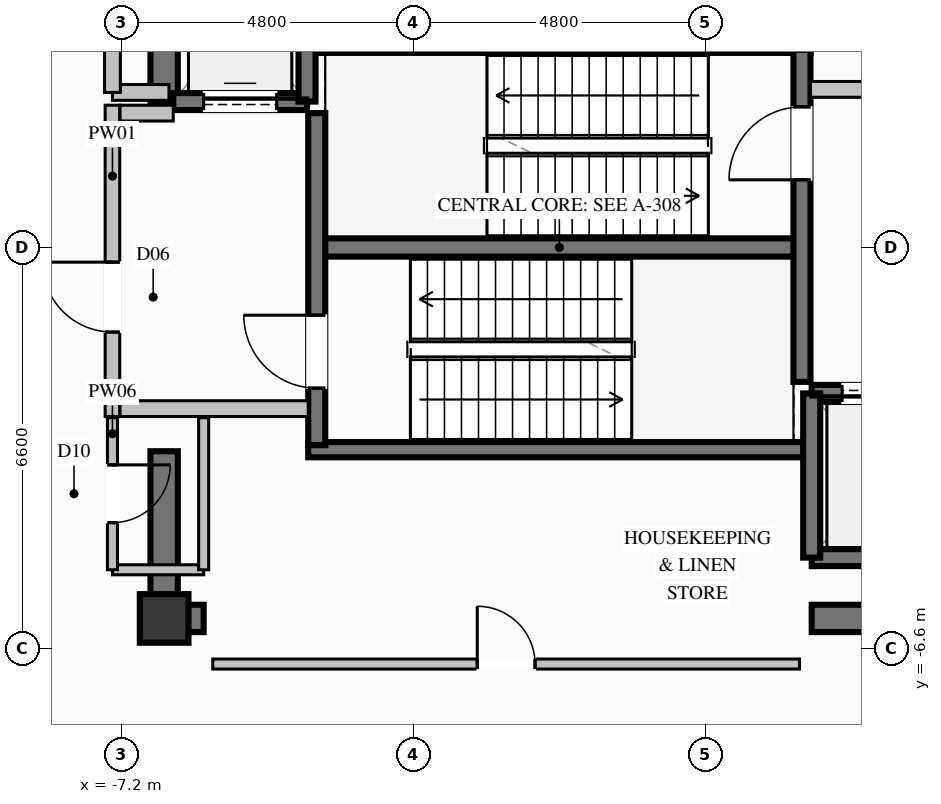
"""IFC4 building model, lengths in metres.
Left out: names, types, materials, properties, quantities, classifications, styles, units other than length and angle.
Written with IfcOpenShell. Run it as: python <this file> out.ifc"""

import sys

from ifc_helpers import new_model, si_unit, direction, frame, frame_2d, origin, origin_2d, place, context, subcontext, project, spatial, rectangle, extrude, element, fill, save


model = new_model("IFC4")
c1 = context("Model", 3, precision=1e-05, world=origin(), true_north=direction((0.0, 1.0)))
c2 = subcontext(c1, "Body", "Model", "MODEL_VIEW")
j1 = project(units=[si_unit("LENGTHUNIT", "METRE"), si_unit("PLANEANGLEUNIT", "RADIAN")], contexts=[c1])
p1 = place(None, origin())
s1 = spatial("IfcSite", under=j1, at=p1, CompositionType="ELEMENT")
p2 = place(p1, origin())
s2 = spatial("IfcBuilding", under=s1, at=p2, CompositionType="ELEMENT")
p3 = place(p2, frame((0.0, 0.0, 297.2)))
s3 = spatial("IfcBuildingStorey", under=s2, at=p3, CompositionType="ELEMENT", Elevation=297.2)
p4 = place(p3, frame((-6.5, -6.1, 0.0), z_axis=(0.0, 0.0, 1.0), x_axis=(1.0, 0.0, 0.0)))
e1 = element("IfcColumn", 1, at=p4, inside=s3, PredefinedType="COLUMN", context=c2, shape_type="SweptSolid", body=[
    extrude(rectangle(XDim=0.8, YDim=0.8, at=origin_2d()), origin(), (0.0, 0.0, 1.0), 5.0),
])
p5 = place(p3, frame((-3.99, 0.0, 0.0), z_axis=(0.0, 0.0, 1.0), x_axis=(1.0, 0.0, 0.0)))
e2 = element("IfcWall", 2, at=p5, inside=s3, PredefinedType="SHEAR", context=c2, shape_type="SweptSolid", body=[
    extrude(rectangle(XDim=7.98, YDim=0.3, at=frame_2d((3.99, 0.0))), origin(), (0.0, 0.0, 1.0), 5.0),
])
for number, where, z_axis, x_axis in (
    (3, (-4.13, -3.325, 0.0), (0.0, 0.0, 1.0), (1.0, 0.0, 0.0)),
    (4, (-4.13, 3.325, 0.0), (0.0, 0.0, 1.0), (1.0, 0.0, 0.0)),
):
    element("IfcWall", number, at=place(p3, frame(where, z_axis=z_axis, x_axis=x_axis)), inside=s3, PredefinedType="SOLIDWALL", context=c2, shape_type="SweptSolid", body=[
        extrude(rectangle(XDim=8.26, YDim=0.25, at=frame_2d((4.13, 0.0))), origin(), (0.0, 0.0, 1.0), 5.0),
    ])
p6 = place(p3, frame((-6.275, -6.1, 0.0), z_axis=(0.0, 0.0, 1.0), x_axis=(1.0, 0.0, 0.0)))
e5 = element("IfcWall", 5, at=p6, inside=s3, PredefinedType="SHEAR", context=c2, shape_type="SweptSolid", body=[
    extrude(rectangle(XDim=0.425, YDim=0.45, at=frame_2d((0.212, 0.0))), origin(), (0.0, 0.0, 1.0), 5.0),
])
p7 = place(p3, frame((4.15, -6.1, 0.0), z_axis=(0.0, 0.0, 1.0), x_axis=(1.0, 0.0, 0.0)))
e6 = element("IfcWall", 6, at=p7, inside=s3, PredefinedType="SHEAR", context=c2, shape_type="SweptSolid", body=[
    extrude(rectangle(XDim=2.125, YDim=0.45, at=frame_2d((1.062, 0.0))), origin(), (0.0, 0.0, 1.0), 5.0),
])
p8 = place(p3, frame((-6.5, 2.35, 0.0), z_axis=(0.0, 0.0, 1.0), x_axis=(0.0, 1.0, 0.0)))
e7 = element("IfcWall", 7, at=p8, inside=s3, PredefinedType="SHEAR", context=c2, shape_type="SweptSolid", body=[
    extrude(rectangle(XDim=3.975, YDim=0.45, at=frame_2d((1.987, 0.0))), origin(), (0.0, 0.0, 1.0), 5.0),
])
p9 = place(p3, frame((-6.5, -6.325, 0.0), z_axis=(0.0, 0.0, 1.0), x_axis=(0.0, 1.0, 0.0)))
e8 = element("IfcWall", 8, at=p9, inside=s3, PredefinedType="SHEAR", context=c2, shape_type="SweptSolid", body=[
    extrude(rectangle(XDim=2.975, YDim=0.45, at=frame_2d((1.487, 0.0))), origin(), (0.0, 0.0, 1.0), 5.0),
])
p10 = place(p3, frame((-6.35, 2.4, 0.0), z_axis=(0.0, 0.0, 1.0), x_axis=(1.0, 0.0, 0.0)))
e9 = element("IfcWall", 9, at=p10, inside=s3, PredefinedType="SOLIDWALL", context=c2, shape_type="SweptSolid", body=[
    extrude(rectangle(XDim=2.2, YDim=0.28, at=frame_2d((1.1, 0.0))), origin(), (0.0, 0.0, 1.0), 4.72),
])
p11 = place(p10, frame((0.5, 0.0, 0.0)))
e10 = element("IfcOpeningElement", 10, at=p11, cuts=e9, PredefinedType="OPENING", context=c2, shape_type="SweptSolid", body=[
    extrude(rectangle(XDim=1.2, YDim=2.2, at=frame_2d((0.6, 1.1))), frame((0.0, 0.15, 0.0), z_axis=(0.0, -1.0, 0.0), x_axis=(1.0, 0.0, 0.0)), (0.0, 0.0, 1.0), 0.3),
])
p12 = place(p3, frame((-4.15, 2.4, 0.0), z_axis=(0.0, 0.0, 1.0), x_axis=(0.0, 1.0, 0.0)))
e11 = element("IfcWall", 11, at=p12, inside=s3, PredefinedType="SOLIDWALL", context=c2, shape_type="SweptSolid", body=[
    extrude(rectangle(XDim=2.7, YDim=0.28, at=frame_2d((1.35, 0.0))), origin(), (0.0, 0.0, 1.0), 4.72),
])
p13 = place(p3, frame((4.15, -5.1, 0.0), z_axis=(0.0, 0.0, 1.0), x_axis=(1.0, 0.0, 0.0)))
e12 = element("IfcWall", 12, at=p13, inside=s3, PredefinedType="SOLIDWALL", context=c2, shape_type="SweptSolid", body=[
    extrude(rectangle(XDim=2.2, YDim=0.28, at=frame_2d((1.1, 0.0))), origin(), (0.0, 0.0, 1.0), 4.72),
])
p14 = place(p3, frame((6.35, -2.4, 0.0), z_axis=(0.0, 0.0, 1.0), x_axis=(-1.0, 0.0, 0.0)))
e13 = element("IfcWall", 13, at=p14, inside=s3, PredefinedType="SOLIDWALL", context=c2, shape_type="SweptSolid", body=[
    extrude(rectangle(XDim=2.2, YDim=0.28, at=frame_2d((1.1, 0.0))), origin(), (0.0, 0.0, 1.0), 4.72),
])
p15 = place(p14, frame((0.5, 0.0, 0.0)))
e14 = element("IfcOpeningElement", 14, at=p15, cuts=e13, PredefinedType="OPENING", context=c2, shape_type="SweptSolid", body=[
    extrude(rectangle(XDim=1.2, YDim=2.2, at=frame_2d((0.6, 1.1))), frame((0.0, 0.15, 0.0), z_axis=(0.0, -1.0, 0.0), x_axis=(1.0, 0.0, 0.0)), (0.0, 0.0, 1.0), 0.3),
])
p16 = place(p3, frame((4.15, -2.4, 0.0), z_axis=(0.0, 0.0, 1.0), x_axis=(0.0, -1.0, 0.0)))
e15 = element("IfcWall", 15, at=p16, inside=s3, PredefinedType="SOLIDWALL", context=c2, shape_type="SweptSolid", body=[
    extrude(rectangle(XDim=2.7, YDim=0.28, at=frame_2d((1.35, 0.0))), origin(), (0.0, 0.0, 1.0), 4.72),
])
p17 = place(p3, frame((-3.99, -3.25, 0.0), z_axis=(0.0, 0.0, 1.0), x_axis=(0.0, 1.0, 0.0)))
e16 = element("IfcWall", 16, at=p17, inside=s3, PredefinedType="SOLIDWALL", context=c2, shape_type="SweptSolid", body=[
    extrude(rectangle(XDim=5.46, YDim=0.28, at=frame_2d((2.73, 0.0))), origin(), (0.0, 0.0, 1.0), 4.72),
])
p18 = place(p17, frame((0.937, 0.0, 0.0)))
e17 = element("IfcOpeningElement", 17, at=p18, cuts=e16, PredefinedType="OPENING", context=c2, shape_type="SweptSolid", body=[
    extrude(rectangle(XDim=1.2, YDim=2.2, at=frame_2d((0.6, 1.1))), frame((0.0, 0.15, 0.0), z_axis=(0.0, -1.0, 0.0), x_axis=(1.0, 0.0, 0.0)), (0.0, 0.0, 1.0), 0.3),
])
p19 = place(p3, frame((3.99, -2.21, 0.0), z_axis=(0.0, 0.0, 1.0), x_axis=(0.0, 1.0, 0.0)))
e18 = element("IfcWall", 18, at=p19, inside=s3, PredefinedType="SOLIDWALL", context=c2, shape_type="SweptSolid", body=[
    extrude(rectangle(XDim=5.46, YDim=0.28, at=frame_2d((2.73, 0.0))), origin(), (0.0, 0.0, 1.0), 4.72),
])
p20 = place(p19, frame((3.323, 0.0, 0.0)))
e19 = element("IfcOpeningElement", 19, at=p20, cuts=e18, PredefinedType="OPENING", context=c2, shape_type="SweptSolid", body=[
    extrude(rectangle(XDim=1.2, YDim=2.2, at=frame_2d((0.6, 1.1))), frame((0.0, 0.15, 0.0), z_axis=(0.0, -1.0, 0.0), x_axis=(1.0, 0.0, 0.0)), (0.0, 0.0, 1.0), 0.3),
])
p21 = place(p3, frame((-7.35, -2.78, 0.0), z_axis=(0.0, 0.0, 1.0), x_axis=(0.0, 1.0, 0.0)))
e20 = element("IfcWall", 20, at=p21, inside=s3, PredefinedType="PARTITIONING", context=c2, shape_type="SweptSolid", body=[
    extrude(rectangle(XDim=5.12, YDim=0.24, at=frame_2d((2.56, 0.0))), origin(), (0.0, 0.0, 1.0), 2.905),
])
p22 = place(p21, frame((1.389, 0.0, 0.0)))
e21 = element("IfcOpeningElement", 21, at=p22, cuts=e20, PredefinedType="OPENING", context=c2, shape_type="SweptSolid", body=[
    extrude(rectangle(XDim=1.15, YDim=2.2, at=frame_2d((0.575, 1.1))), frame((0.0, 0.13, 0.0), z_axis=(0.0, -1.0, 0.0), x_axis=(1.0, 0.0, 0.0)), (0.0, 0.0, 1.0), 0.26),
])
p23 = place(p3, frame((-7.225, -2.65, 0.0), z_axis=(0.0, 0.0, 1.0), x_axis=(1.0, 0.0, 0.0)))
e22 = element("IfcWall", 22, at=p23, inside=s3, PredefinedType="PARTITIONING", context=c2, shape_type="SweptSolid", body=[
    extrude(rectangle(XDim=3.095, YDim=0.26, at=frame_2d((1.548, 0.0))), origin(), (0.0, 0.0, 1.0), 4.72),
])
p24 = place(p3, frame((-7.225, 2.21, 0.0), z_axis=(0.0, 0.0, 1.0), x_axis=(1.0, 0.0, 0.0)))
e23 = element("IfcWall", 23, at=p24, inside=s3, PredefinedType="PARTITIONING", context=c2, shape_type="SweptSolid", body=[
    extrude(rectangle(XDim=0.875, YDim=0.26, at=frame_2d((0.438, 0.0))), origin(), (0.0, 0.0, 1.0), 4.72),
])
p25 = place(p3, frame((4.13, 2.6, 0.0), z_axis=(0.0, 0.0, 1.0), x_axis=(1.0, 0.0, 0.0)))
e24 = element("IfcWall", 24, at=p25, inside=s3, PredefinedType="PARTITIONING", context=c2, shape_type="SweptSolid", body=[
    extrude(rectangle(XDim=3.095, YDim=0.26, at=frame_2d((1.548, 0.0))), origin(), (0.0, 0.0, 1.0), 4.72),
])
p26 = place(p3, frame((-7.35, 2.55, 0.0), z_axis=(0.0, 0.0, 1.0), x_axis=(1.0, 0.0, 0.0)))
e25 = element("IfcWall", 25, at=p26, inside=s3, PredefinedType="PARTITIONING", context=c2, shape_type="SweptSolid", body=[
    extrude(rectangle(XDim=0.93, YDim=0.26, at=frame_2d((0.465, 0.0))), origin(), (0.0, 0.0, 1.0), 4.72),
])
p27 = place(p3, frame((-7.35, 2.55, 0.0), z_axis=(0.0, 0.0, 1.0), x_axis=(0.0, 1.0, 0.0)))
e26 = element("IfcWall", 26, at=p27, inside=s3, PredefinedType="PARTITIONING", context=c2, shape_type="SweptSolid", body=[
    extrude(rectangle(XDim=2.4, YDim=0.26, at=frame_2d((1.2, 0.0))), origin(), (0.0, 0.0, 1.0), 2.905),
])
p28 = place(p27, frame((0.775, 0.0, 0.0)))
e27 = element("IfcOpeningElement", 27, at=p28, cuts=e26, PredefinedType="OPENING", context=c2, shape_type="SweptSolid", body=[
    extrude(rectangle(XDim=0.85, YDim=2.05, at=frame_2d((0.425, 1.025))), frame((0.0, 0.14, 0.0), z_axis=(0.0, -1.0, 0.0), x_axis=(1.0, 0.0, 0.0)), (0.0, 0.0, 1.0), 0.28),
])
p29 = place(p3, frame((-7.35, -5.3, 0.0), z_axis=(0.0, 0.0, 1.0), x_axis=(1.0, 0.0, 0.0)))
e28 = element("IfcWall", 28, at=p29, inside=s3, PredefinedType="PARTITIONING", context=c2, shape_type="SweptSolid", body=[
    extrude(rectangle(XDim=1.5, YDim=0.165, at=frame_2d((0.75, 0.0))), origin(), (0.0, 0.0, 1.0), 2.905),
])
p30 = place(p3, frame((-5.85, -5.3, 0.0), z_axis=(0.0, 0.0, 1.0), x_axis=(0.0, 1.0, 0.0)))
e29 = element("IfcWall", 29, at=p30, inside=s3, PredefinedType="PARTITIONING", context=c2, shape_type="SweptSolid", body=[
    extrude(rectangle(XDim=2.5, YDim=0.165, at=frame_2d((1.25, 0.0))), origin(), (0.0, 0.0, 1.0), 2.905),
])
p31 = place(p3, frame((-7.35, -2.8, 0.0), z_axis=(0.0, 0.0, 1.0), x_axis=(0.0, -1.0, 0.0)))
e30 = element("IfcWall", 30, at=p31, inside=s3, PredefinedType="PARTITIONING", context=c2, shape_type="SweptSolid", body=[
    extrude(rectangle(XDim=2.5, YDim=0.165, at=frame_2d((1.25, 0.0))), origin(), (0.0, 0.0, 1.0), 2.905),
])
p32 = place(p31, frame((0.775, 0.0, 0.0)))
e31 = element("IfcOpeningElement", 31, at=p32, cuts=e30, PredefinedType="OPENING", context=c2, shape_type="SweptSolid", body=[
    extrude(rectangle(XDim=0.95, YDim=2.1, at=frame_2d((0.475, 1.05))), frame((0.0, 0.093, 0.0), z_axis=(0.0, -1.0, 0.0), x_axis=(1.0, 0.0, 0.0)), (0.0, 0.0, 1.0), 0.185),
])
p33 = place(p3, frame((-5.7, -6.85, 0.0), z_axis=(0.0, 0.0, 1.0), x_axis=(1.0, 0.0, 0.0)))
e32 = element("IfcWall", 32, at=p33, inside=s3, PredefinedType="PARTITIONING", context=c2, shape_type="SweptSolid", body=[
    extrude(rectangle(XDim=9.65, YDim=0.165, at=frame_2d((4.825, 0.0))), origin(), (0.0, 0.0, 1.0), 2.905),
])
p34 = place(p33, frame((4.35, 0.0, 0.0)))
e33 = element("IfcOpeningElement", 33, at=p34, cuts=e32, PredefinedType="OPENING", context=c2, shape_type="SweptSolid", body=[
    extrude(rectangle(XDim=0.95, YDim=2.1, at=frame_2d((0.475, 1.05))), frame((0.0, 0.093, 0.0), z_axis=(0.0, -1.0, 0.0), x_axis=(1.0, 0.0, 0.0)), (0.0, 0.0, 1.0), 0.185),
])
p35 = place(p11, origin())
e34 = element("IfcDoor", 34, at=p35, inside=s3, OperationType="SLIDING_TO_LEFT", PredefinedType="DOOR", context=c2, shape_type="SweptSolid", body=[
    extrude(rectangle(XDim=1.2, YDim=2.2, at=frame_2d((0.6, 1.1))), frame((0.0, 0.025, 0.0), z_axis=(0.0, -1.0, 0.0), x_axis=(1.0, 0.0, 0.0)), (0.0, 0.0, 1.0), 0.05),
])
fill(e10, e34)
p36 = place(p15, origin())
e35 = element("IfcDoor", 35, at=p36, inside=s3, OperationType="SLIDING_TO_LEFT", PredefinedType="DOOR", context=c2, shape_type="SweptSolid", body=[
    extrude(rectangle(XDim=1.2, YDim=2.2, at=frame_2d((0.6, 1.1))), frame((0.0, 0.025, 0.0), z_axis=(0.0, -1.0, 0.0), x_axis=(1.0, 0.0, 0.0)), (0.0, 0.0, 1.0), 0.05),
])
fill(e14, e35)
p37 = place(p18, origin())
e36 = element("IfcDoor", 36, at=p37, inside=s3, OperationType="SINGLE_SWING_RIGHT", PredefinedType="DOOR", context=c2, shape_type="SweptSolid", body=[
    extrude(rectangle(XDim=1.2, YDim=2.2, at=frame_2d((0.6, 1.1))), frame((0.0, 0.025, 0.0), z_axis=(0.0, -1.0, 0.0), x_axis=(1.0, 0.0, 0.0)), (0.0, 0.0, 1.0), 0.05),
])
fill(e17, e36)
p38 = place(p20, origin())
e37 = element("IfcDoor", 37, at=p38, inside=s3, OperationType="SINGLE_SWING_LEFT", PredefinedType="DOOR", context=c2, shape_type="SweptSolid", body=[
    extrude(rectangle(XDim=1.2, YDim=2.2, at=frame_2d((0.6, 1.1))), frame((0.0, 0.025, 0.0), z_axis=(0.0, -1.0, 0.0), x_axis=(1.0, 0.0, 0.0)), (0.0, 0.0, 1.0), 0.05),
])
fill(e19, e37)
p39 = place(p22, origin())
e38 = element("IfcDoor", 38, at=p39, inside=s3, OperationType="SINGLE_SWING_RIGHT", PredefinedType="DOOR", context=c2, shape_type="SweptSolid", body=[
    extrude(rectangle(XDim=1.15, YDim=2.2, at=frame_2d((0.575, 1.1))), frame((0.0, 0.025, 0.0), z_axis=(0.0, -1.0, 0.0), x_axis=(1.0, 0.0, 0.0)), (0.0, 0.0, 1.0), 0.05),
])
fill(e21, e38)
p40 = place(p32, origin())
e39 = element("IfcDoor", 39, at=p40, inside=s3, OperationType="SINGLE_SWING_LEFT", PredefinedType="DOOR", context=c2, shape_type="SweptSolid", body=[
    extrude(rectangle(XDim=0.95, YDim=2.1, at=frame_2d((0.475, 1.05))), frame((0.0, 0.025, 0.0), z_axis=(0.0, -1.0, 0.0), x_axis=(1.0, 0.0, 0.0)), (0.0, 0.0, 1.0), 0.05),
])
fill(e31, e39)
p41 = place(p34, origin())
e40 = element("IfcDoor", 40, at=p41, inside=s3, OperationType="SINGLE_SWING_LEFT", PredefinedType="DOOR", context=c2, shape_type="SweptSolid", body=[
    extrude(rectangle(XDim=0.95, YDim=2.1, at=frame_2d((0.475, 1.05))), frame((0.0, 0.025, 0.0), z_axis=(0.0, -1.0, 0.0), x_axis=(1.0, 0.0, 0.0)), (0.0, 0.0, 1.0), 0.05),
])
fill(e33, e40)
save(model, sys.argv[1])
